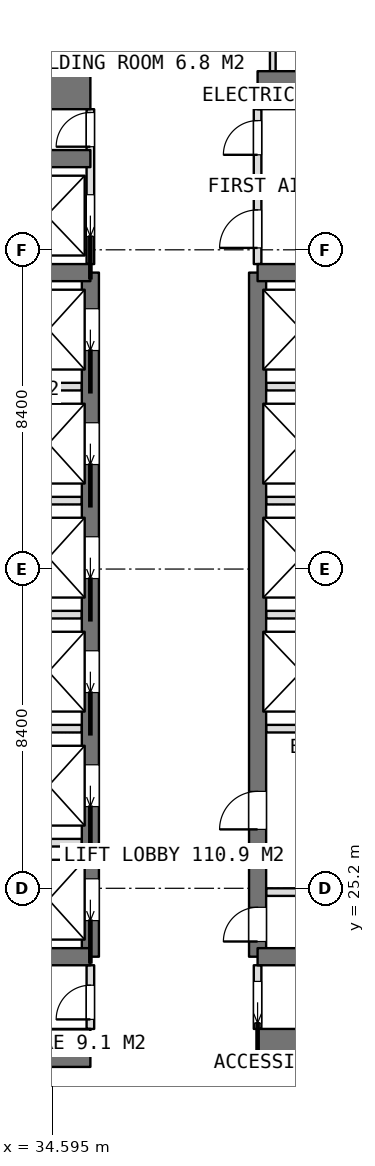
"""IFC4 building model, lengths in metres.
Left out: names, types, materials, properties, quantities, classifications, styles, units other than length and angle.
Written with IfcOpenShell. Run it as: python <this file> out.ifc"""

import sys

from ifc_helpers import new_model, si_unit, direction, frame, frame_2d, origin, place, context, subcontext, project, spatial, rectangle, extrude, element, fill, save


model = new_model("IFC4")
c1 = context("Model", 3, precision=1e-05, world=origin(), true_north=direction((0.0, 1.0)))
c2 = subcontext(c1, "Body", "Model", "MODEL_VIEW")
j1 = project(units=[si_unit("LENGTHUNIT", "METRE"), si_unit("PLANEANGLEUNIT", "RADIAN")], contexts=[c1])
p1 = place(None, origin())
s1 = spatial("IfcSite", under=j1, at=p1, CompositionType="ELEMENT")
p2 = place(p1, origin())
s2 = spatial("IfcBuilding", under=s1, at=p2, CompositionType="ELEMENT")
p3 = place(p2, frame((0.0, 0.0, 129.05)))
s3 = spatial("IfcBuildingStorey", under=s2, at=p3, CompositionType="ELEMENT", Elevation=129.05)
p4 = place(p3, frame((25.2, 21.0, 0.0), z_axis=(0.0, 0.0, 1.0), x_axis=(1.0, 0.0, 0.0)))
e1 = element("IfcWall", 1, at=p4, inside=s3, PredefinedType="SHEAR", context=c2, shape_type="SweptSolid", body=[
    extrude(rectangle(XDim=10.4, YDim=1.0, at=frame_2d((5.2, 0.0))), origin(), (0.0, 0.0, 1.0), 3.75),
])
p5 = place(p3, frame((40.0, 21.0, 0.0), z_axis=(0.0, 0.0, 1.0), x_axis=(1.0, 0.0, 0.0)))
e2 = element("IfcWall", 2, at=p5, inside=s3, PredefinedType="SHEAR", context=c2, shape_type="SweptSolid", body=[
    extrude(rectangle(XDim=10.4, YDim=1.0, at=frame_2d((5.2, 0.0))), origin(), (0.0, 0.0, 1.0), 3.75),
])
p6 = place(p3, frame((25.2, 46.2, 0.0), z_axis=(0.0, 0.0, 1.0), x_axis=(1.0, 0.0, 0.0)))
e3 = element("IfcWall", 3, at=p6, inside=s3, PredefinedType="SHEAR", context=c2, shape_type="SweptSolid", body=[
    extrude(rectangle(XDim=10.4, YDim=1.0, at=frame_2d((5.2, 0.0))), origin(), (0.0, 0.0, 1.0), 3.75),
])
p7 = place(p3, frame((40.0, 46.2, 0.0), z_axis=(0.0, 0.0, 1.0), x_axis=(1.0, 0.0, 0.0)))
e4 = element("IfcWall", 4, at=p7, inside=s3, PredefinedType="SHEAR", context=c2, shape_type="SweptSolid", body=[
    extrude(rectangle(XDim=10.4, YDim=1.0, at=frame_2d((5.2, 0.0))), origin(), (0.0, 0.0, 1.0), 3.75),
])
p8 = place(p3, frame((35.6, 23.4, 0.0), z_axis=(0.0, 0.0, 1.0), x_axis=(0.0, 1.0, 0.0)))
e5 = element("IfcWall", 5, at=p8, inside=s3, PredefinedType="SHEAR", context=c2, shape_type="SweptSolid", body=[
    extrude(rectangle(XDim=18.0, YDim=0.45, at=frame_2d((9.0, 0.0))), origin(), (0.0, 0.0, 1.0), 3.75),
])
p9 = place(p8, frame((0.95, 0.0, 0.0)))
e6 = element("IfcOpeningElement", 6, at=p9, cuts=e5, PredefinedType="OPENING", context=c2, shape_type="SweptSolid", body=[
    extrude(rectangle(XDim=1.1, YDim=2.1, at=frame_2d((0.55, 1.05))), frame((0.0, 0.235, 0.0), z_axis=(0.0, -1.0, 0.0), x_axis=(1.0, 0.0, 0.0)), (0.0, 0.0, 1.0), 0.47),
])
p10 = place(p8, frame((3.95, 0.0, 0.0)))
e7 = element("IfcOpeningElement", 7, at=p10, cuts=e5, PredefinedType="OPENING", context=c2, shape_type="SweptSolid", body=[
    extrude(rectangle(XDim=1.1, YDim=2.1, at=frame_2d((0.55, 1.05))), frame((0.0, 0.235, 0.0), z_axis=(0.0, -1.0, 0.0), x_axis=(1.0, 0.0, 0.0)), (0.0, 0.0, 1.0), 0.47),
])
p11 = place(p8, frame((6.95, 0.0, 0.0)))
e8 = element("IfcOpeningElement", 8, at=p11, cuts=e5, PredefinedType="OPENING", context=c2, shape_type="SweptSolid", body=[
    extrude(rectangle(XDim=1.1, YDim=2.1, at=frame_2d((0.55, 1.05))), frame((0.0, 0.235, 0.0), z_axis=(0.0, -1.0, 0.0), x_axis=(1.0, 0.0, 0.0)), (0.0, 0.0, 1.0), 0.47),
])
p12 = place(p8, frame((9.95, 0.0, 0.0)))
e9 = element("IfcOpeningElement", 9, at=p12, cuts=e5, PredefinedType="OPENING", context=c2, shape_type="SweptSolid", body=[
    extrude(rectangle(XDim=1.1, YDim=2.1, at=frame_2d((0.55, 1.05))), frame((0.0, 0.235, 0.0), z_axis=(0.0, -1.0, 0.0), x_axis=(1.0, 0.0, 0.0)), (0.0, 0.0, 1.0), 0.47),
])
p13 = place(p8, frame((12.95, 0.0, 0.0)))
e10 = element("IfcOpeningElement", 10, at=p13, cuts=e5, PredefinedType="OPENING", context=c2, shape_type="SweptSolid", body=[
    extrude(rectangle(XDim=1.1, YDim=2.1, at=frame_2d((0.55, 1.05))), frame((0.0, 0.235, 0.0), z_axis=(0.0, -1.0, 0.0), x_axis=(1.0, 0.0, 0.0)), (0.0, 0.0, 1.0), 0.47),
])
p14 = place(p8, frame((15.95, 0.0, 0.0)))
e11 = element("IfcOpeningElement", 11, at=p14, cuts=e5, PredefinedType="OPENING", context=c2, shape_type="SweptSolid", body=[
    extrude(rectangle(XDim=1.1, YDim=2.1, at=frame_2d((0.55, 1.05))), frame((0.0, 0.235, 0.0), z_axis=(0.0, -1.0, 0.0), x_axis=(1.0, 0.0, 0.0)), (0.0, 0.0, 1.0), 0.47),
])
p15 = place(p3, frame((40.0, 23.4, 0.0), z_axis=(0.0, 0.0, 1.0), x_axis=(0.0, 1.0, 0.0)))
e12 = element("IfcWall", 12, at=p15, inside=s3, PredefinedType="SHEAR", context=c2, shape_type="SweptSolid", body=[
    extrude(rectangle(XDim=18.0, YDim=0.45, at=frame_2d((9.0, 0.0))), origin(), (0.0, 0.0, 1.0), 3.75),
])
p16 = place(p15, frame((0.4, 0.0, 0.0)))
e13 = element("IfcOpeningElement", 13, at=p16, cuts=e12, PredefinedType="OPENING", context=c2, shape_type="SweptSolid", body=[
    extrude(rectangle(XDim=0.9, YDim=2.1, at=frame_2d((0.45, 1.05))), frame((0.0, 0.235, 0.0), z_axis=(0.0, -1.0, 0.0), x_axis=(1.0, 0.0, 0.0)), (0.0, 0.0, 1.0), 0.47),
])
p17 = place(p15, frame((3.35, 0.0, 0.0)))
e14 = element("IfcOpeningElement", 14, at=p17, cuts=e12, PredefinedType="OPENING", context=c2, shape_type="SweptSolid", body=[
    extrude(rectangle(XDim=1.0, YDim=2.1, at=frame_2d((0.5, 1.05))), frame((0.0, 0.235, 0.0), z_axis=(0.0, -1.0, 0.0), x_axis=(1.0, 0.0, 0.0)), (0.0, 0.0, 1.0), 0.47),
])
for number, where, z_axis, x_axis in (
    (15, (31.8, 23.4, 0.0), (0.0, 0.0, 1.0), (1.0, 0.0, 0.0)),
    (16, (31.8, 41.4, 0.0), (0.0, 0.0, 1.0), (1.0, 0.0, 0.0)),
    (17, (31.8, 44.4, 0.0), (0.0, 0.0, 1.0), (1.0, 0.0, 0.0)),
    (18, (40.0, 23.4, 0.0), (0.0, 0.0, 1.0), (1.0, 0.0, 0.0)),
    (19, (40.0, 41.4, 0.0), (0.0, 0.0, 1.0), (1.0, 0.0, 0.0)),
):
    element("IfcWall", number, at=place(p3, frame(where, z_axis=z_axis, x_axis=x_axis)), inside=s3, PredefinedType="SHEAR", context=c2, shape_type="SweptSolid", body=[
        extrude(rectangle(XDim=3.8, YDim=0.45, at=frame_2d((1.9, 0.0))), origin(), (0.0, 0.0, 1.0), 3.75),
    ])
for number, where, z_axis, x_axis in (
    (20, (32.025, 26.4, 0.0), (0.0, 0.0, 1.0), (1.0, 0.0, 0.0)),
    (21, (32.025, 29.4, 0.0), (0.0, 0.0, 1.0), (1.0, 0.0, 0.0)),
    (22, (32.025, 32.4, 0.0), (0.0, 0.0, 1.0), (1.0, 0.0, 0.0)),
    (23, (32.025, 35.4, 0.0), (0.0, 0.0, 1.0), (1.0, 0.0, 0.0)),
    (24, (32.025, 38.4, 0.0), (0.0, 0.0, 1.0), (1.0, 0.0, 0.0)),
):
    element("IfcWall", number, at=place(p3, frame(where, z_axis=z_axis, x_axis=x_axis)), inside=s3, PredefinedType="PARTITIONING", context=c2, shape_type="SweptSolid", body=[
        extrude(rectangle(XDim=3.35, YDim=0.2, at=frame_2d((1.675, 0.0))), origin(), (0.0, 0.0, 1.0), 3.5),
    ])
for number, where, z_axis, x_axis in (
    (25, (40.225, 29.4, 0.0), (0.0, 0.0, 1.0), (1.0, 0.0, 0.0)),
    (26, (40.225, 32.4, 0.0), (0.0, 0.0, 1.0), (1.0, 0.0, 0.0)),
    (27, (40.225, 35.4, 0.0), (0.0, 0.0, 1.0), (1.0, 0.0, 0.0)),
    (28, (40.225, 38.4, 0.0), (0.0, 0.0, 1.0), (1.0, 0.0, 0.0)),
):
    element("IfcWall", number, at=place(p3, frame(where, z_axis=z_axis, x_axis=x_axis)), inside=s3, PredefinedType="PARTITIONING", context=c2, shape_type="SweptSolid", body=[
        extrude(rectangle(XDim=3.35, YDim=0.2, at=frame_2d((1.675, 0.0))), origin(), (0.0, 0.0, 1.0), 3.5),
    ])
p18 = place(p3, frame((40.0, 21.5, 0.0), z_axis=(0.0, 0.0, 1.0), x_axis=(0.0, 1.0, 0.0)))
e29 = element("IfcWall", 29, at=p18, inside=s3, PredefinedType="PARTITIONING", context=c2, shape_type="SweptSolid", body=[
    extrude(rectangle(XDim=1.675, YDim=0.2, at=frame_2d((0.837, 0.0))), origin(), (0.0, 0.0, 1.0), 3.5),
])
p19 = place(p18, frame((0.15, 0.0, 0.0)))
e30 = element("IfcOpeningElement", 30, at=p19, cuts=e29, PredefinedType="OPENING", context=c2, shape_type="SweptSolid", body=[
    extrude(rectangle(XDim=1.1, YDim=2.1, at=frame_2d((0.55, 1.05))), frame((0.0, 0.11, 0.0), z_axis=(0.0, -1.0, 0.0), x_axis=(1.0, 0.0, 0.0)), (0.0, 0.0, 1.0), 0.22),
])
p20 = place(p3, frame((40.0, 41.625, 0.0), z_axis=(0.0, 0.0, 1.0), x_axis=(0.0, 1.0, 0.0)))
e31 = element("IfcWall", 31, at=p20, inside=s3, PredefinedType="PARTITIONING", context=c2, shape_type="SweptSolid", body=[
    extrude(rectangle(XDim=4.075, YDim=0.2, at=frame_2d((2.038, 0.0))), origin(), (0.0, 0.0, 1.0), 3.5),
])
p21 = place(p20, frame((2.875, 0.0, 0.0)))
e32 = element("IfcOpeningElement", 32, at=p21, cuts=e31, PredefinedType="OPENING", context=c2, shape_type="SweptSolid", body=[
    extrude(rectangle(XDim=0.9, YDim=2.1, at=frame_2d((0.45, 1.05))), frame((0.0, 0.11, 0.0), z_axis=(0.0, -1.0, 0.0), x_axis=(1.0, 0.0, 0.0)), (0.0, 0.0, 1.0), 0.22),
])
p22 = place(p20, frame((0.425, 0.0, 0.0)))
e33 = element("IfcOpeningElement", 33, at=p22, cuts=e31, PredefinedType="OPENING", context=c2, shape_type="SweptSolid", body=[
    extrude(rectangle(XDim=1.0, YDim=2.1, at=frame_2d((0.5, 1.05))), frame((0.0, 0.11, 0.0), z_axis=(0.0, -1.0, 0.0), x_axis=(1.0, 0.0, 0.0)), (0.0, 0.0, 1.0), 0.22),
])
p23 = place(p3, frame((35.6, 41.625, 0.0), z_axis=(0.0, 0.0, 1.0), x_axis=(0.0, 1.0, 0.0)))
e34 = element("IfcWall", 34, at=p23, inside=s3, PredefinedType="PARTITIONING", context=c2, shape_type="SweptSolid", body=[
    extrude(rectangle(XDim=4.075, YDim=0.2, at=frame_2d((2.038, 0.0))), origin(), (0.0, 0.0, 1.0), 3.5),
])
p24 = place(p23, frame((3.088, 0.0, 0.0)))
e35 = element("IfcOpeningElement", 35, at=p24, cuts=e34, PredefinedType="OPENING", context=c2, shape_type="SweptSolid", body=[
    extrude(rectangle(XDim=0.9, YDim=2.1, at=frame_2d((0.45, 1.05))), frame((0.0, 0.11, 0.0), z_axis=(0.0, -1.0, 0.0), x_axis=(1.0, 0.0, 0.0)), (0.0, 0.0, 1.0), 0.22),
])
p25 = place(p23, frame((0.725, 0.0, 0.0)))
e36 = element("IfcOpeningElement", 36, at=p25, cuts=e34, PredefinedType="OPENING", context=c2, shape_type="SweptSolid", body=[
    extrude(rectangle(XDim=1.1, YDim=2.1, at=frame_2d((0.55, 1.05))), frame((0.0, 0.11, 0.0), z_axis=(0.0, -1.0, 0.0), x_axis=(1.0, 0.0, 0.0)), (0.0, 0.0, 1.0), 0.22),
])
p26 = place(p3, frame((35.6, 21.5, 0.0), z_axis=(0.0, 0.0, 1.0), x_axis=(0.0, 1.0, 0.0)))
e37 = element("IfcWall", 37, at=p26, inside=s3, PredefinedType="PARTITIONING", context=c2, shape_type="SweptSolid", body=[
    extrude(rectangle(XDim=1.675, YDim=0.2, at=frame_2d((0.837, 0.0))), origin(), (0.0, 0.0, 1.0), 3.5),
])
p27 = place(p26, frame((0.25, 0.0, 0.0)))
e38 = element("IfcOpeningElement", 38, at=p27, cuts=e37, PredefinedType="OPENING", context=c2, shape_type="SweptSolid", body=[
    extrude(rectangle(XDim=0.9, YDim=2.1, at=frame_2d((0.45, 1.05))), frame((0.0, 0.11, 0.0), z_axis=(0.0, -1.0, 0.0), x_axis=(1.0, 0.0, 0.0)), (0.0, 0.0, 1.0), 0.22),
])
p28 = place(p3, frame((40.225, 25.1, 0.0), z_axis=(0.0, 0.0, 1.0), x_axis=(1.0, 0.0, 0.0)))
e39 = element("IfcWall", 39, at=p28, inside=s3, PredefinedType="PARTITIONING", context=c2, shape_type="SweptSolid", body=[
    extrude(rectangle(XDim=3.35, YDim=0.2, at=frame_2d((1.675, 0.0))), origin(), (0.0, 0.0, 1.0), 3.5),
])
p29 = place(p3, frame((40.0, 43.7, 0.0), z_axis=(0.0, 0.0, 1.0), x_axis=(1.0, 0.0, 0.0)))
e40 = element("IfcWall", 40, at=p29, inside=s3, PredefinedType="PARTITIONING", context=c2, shape_type="SweptSolid", body=[
    extrude(rectangle(XDim=3.575, YDim=0.2, at=frame_2d((1.788, 0.0))), origin(), (0.0, 0.0, 1.0), 3.5),
])
for number, where, z_axis, x_axis in (
    (41, (40.4, 46.7, 0.0), (0.0, 0.0, 1.0), (0.0, 1.0, 0.0)),
    (42, (35.2, 46.7, 0.0), (0.0, 0.0, 1.0), (0.0, 1.0, 0.0)),
):
    element("IfcWall", number, at=place(p3, frame(where, z_axis=z_axis, x_axis=x_axis)), inside=s3, PredefinedType="PARTITIONING", context=c2, shape_type="SweptSolid", body=[
        extrude(rectangle(XDim=2.625, YDim=0.15, at=frame_2d((1.312, 0.0))), origin(), (0.0, 0.0, 1.0), 3.5),
    ])
p30 = place(p19, origin())
e43 = element("IfcDoor", 43, at=p30, inside=s3, OperationType="SLIDING_TO_LEFT", PredefinedType="DOOR", context=c2, shape_type="SweptSolid", body=[
    extrude(rectangle(XDim=1.1, YDim=2.1, at=frame_2d((0.55, 1.05))), frame((0.0, 0.025, 0.0), z_axis=(0.0, -1.0, 0.0), x_axis=(1.0, 0.0, 0.0)), (0.0, 0.0, 1.0), 0.05),
])
fill(e30, e43)
p31 = place(p27, origin())
e44 = element("IfcDoor", 44, at=p31, inside=s3, OperationType="SINGLE_SWING_LEFT", PredefinedType="DOOR", context=c2, shape_type="SweptSolid", body=[
    extrude(rectangle(XDim=0.9, YDim=2.1, at=frame_2d((0.45, 1.05))), frame((0.0, 0.025, 0.0), z_axis=(0.0, -1.0, 0.0), x_axis=(1.0, 0.0, 0.0)), (0.0, 0.0, 1.0), 0.05),
])
fill(e38, e44)
p32 = place(p21, origin())
e45 = element("IfcDoor", 45, at=p32, inside=s3, OperationType="SINGLE_SWING_LEFT", PredefinedType="DOOR", context=c2, shape_type="SweptSolid", body=[
    extrude(rectangle(XDim=0.9, YDim=2.1, at=frame_2d((0.45, 1.05))), frame((0.0, 0.025, 0.0), z_axis=(0.0, -1.0, 0.0), x_axis=(1.0, 0.0, 0.0)), (0.0, 0.0, 1.0), 0.05),
])
fill(e32, e45)
p33 = place(p22, origin())
e46 = element("IfcDoor", 46, at=p33, inside=s3, OperationType="SINGLE_SWING_LEFT", PredefinedType="DOOR", context=c2, shape_type="SweptSolid", body=[
    extrude(rectangle(XDim=1.0, YDim=2.1, at=frame_2d((0.5, 1.05))), frame((0.0, 0.025, 0.0), z_axis=(0.0, -1.0, 0.0), x_axis=(1.0, 0.0, 0.0)), (0.0, 0.0, 1.0), 0.05),
])
fill(e33, e46)
p34 = place(p16, origin())
e47 = element("IfcDoor", 47, at=p34, inside=s3, OperationType="SINGLE_SWING_LEFT", PredefinedType="DOOR", context=c2, shape_type="SweptSolid", body=[
    extrude(rectangle(XDim=0.9, YDim=2.1, at=frame_2d((0.45, 1.05))), frame((0.0, 0.025, 0.0), z_axis=(0.0, -1.0, 0.0), x_axis=(1.0, 0.0, 0.0)), (0.0, 0.0, 1.0), 0.05),
])
fill(e13, e47)
p35 = place(p17, origin())
e48 = element("IfcDoor", 48, at=p35, inside=s3, OperationType="SINGLE_SWING_LEFT", PredefinedType="DOOR", context=c2, shape_type="SweptSolid", body=[
    extrude(rectangle(XDim=1.0, YDim=2.1, at=frame_2d((0.5, 1.05))), frame((0.0, 0.025, 0.0), z_axis=(0.0, -1.0, 0.0), x_axis=(1.0, 0.0, 0.0)), (0.0, 0.0, 1.0), 0.05),
])
fill(e14, e48)
p36 = place(p24, origin())
e49 = element("IfcDoor", 49, at=p36, inside=s3, OperationType="SINGLE_SWING_LEFT", PredefinedType="DOOR", context=c2, shape_type="SweptSolid", body=[
    extrude(rectangle(XDim=0.9, YDim=2.1, at=frame_2d((0.45, 1.05))), frame((0.0, 0.025, 0.0), z_axis=(0.0, -1.0, 0.0), x_axis=(1.0, 0.0, 0.0)), (0.0, 0.0, 1.0), 0.05),
])
fill(e35, e49)
p37 = place(p9, origin())
e50 = element("IfcDoor", 50, at=p37, inside=s3, OperationType="SLIDING_TO_LEFT", PredefinedType="USERDEFINED", context=c2, shape_type="SweptSolid", body=[
    extrude(rectangle(XDim=1.1, YDim=2.1, at=frame_2d((0.55, 1.05))), frame((0.0, 0.025, 0.0), z_axis=(0.0, -1.0, 0.0), x_axis=(1.0, 0.0, 0.0)), (0.0, 0.0, 1.0), 0.05),
])
fill(e6, e50)
p38 = place(p10, origin())
e51 = element("IfcDoor", 51, at=p38, inside=s3, OperationType="SLIDING_TO_LEFT", PredefinedType="USERDEFINED", context=c2, shape_type="SweptSolid", body=[
    extrude(rectangle(XDim=1.1, YDim=2.1, at=frame_2d((0.55, 1.05))), frame((0.0, 0.025, 0.0), z_axis=(0.0, -1.0, 0.0), x_axis=(1.0, 0.0, 0.0)), (0.0, 0.0, 1.0), 0.05),
])
fill(e7, e51)
p39 = place(p11, origin())
e52 = element("IfcDoor", 52, at=p39, inside=s3, OperationType="SLIDING_TO_LEFT", PredefinedType="USERDEFINED", context=c2, shape_type="SweptSolid", body=[
    extrude(rectangle(XDim=1.1, YDim=2.1, at=frame_2d((0.55, 1.05))), frame((0.0, 0.025, 0.0), z_axis=(0.0, -1.0, 0.0), x_axis=(1.0, 0.0, 0.0)), (0.0, 0.0, 1.0), 0.05),
])
fill(e8, e52)
p40 = place(p12, origin())
e53 = element("IfcDoor", 53, at=p40, inside=s3, OperationType="SLIDING_TO_LEFT", PredefinedType="USERDEFINED", context=c2, shape_type="SweptSolid", body=[
    extrude(rectangle(XDim=1.1, YDim=2.1, at=frame_2d((0.55, 1.05))), frame((0.0, 0.025, 0.0), z_axis=(0.0, -1.0, 0.0), x_axis=(1.0, 0.0, 0.0)), (0.0, 0.0, 1.0), 0.05),
])
fill(e9, e53)
p41 = place(p13, origin())
e54 = element("IfcDoor", 54, at=p41, inside=s3, OperationType="SLIDING_TO_LEFT", PredefinedType="USERDEFINED", context=c2, shape_type="SweptSolid", body=[
    extrude(rectangle(XDim=1.1, YDim=2.1, at=frame_2d((0.55, 1.05))), frame((0.0, 0.025, 0.0), z_axis=(0.0, -1.0, 0.0), x_axis=(1.0, 0.0, 0.0)), (0.0, 0.0, 1.0), 0.05),
])
fill(e10, e54)
p42 = place(p14, origin())
e55 = element("IfcDoor", 55, at=p42, inside=s3, OperationType="SLIDING_TO_LEFT", PredefinedType="USERDEFINED", context=c2, shape_type="SweptSolid", body=[
    extrude(rectangle(XDim=1.1, YDim=2.1, at=frame_2d((0.55, 1.05))), frame((0.0, 0.025, 0.0), z_axis=(0.0, -1.0, 0.0), x_axis=(1.0, 0.0, 0.0)), (0.0, 0.0, 1.0), 0.05),
])
fill(e11, e55)
p43 = place(p25, origin())
e56 = element("IfcDoor", 56, at=p43, inside=s3, OperationType="SLIDING_TO_LEFT", PredefinedType="USERDEFINED", context=c2, shape_type="SweptSolid", body=[
    extrude(rectangle(XDim=1.1, YDim=2.1, at=frame_2d((0.55, 1.05))), frame((0.0, 0.025, 0.0), z_axis=(0.0, -1.0, 0.0), x_axis=(1.0, 0.0, 0.0)), (0.0, 0.0, 1.0), 0.05),
])
fill(e36, e56)
save(model, sys.argv[1])
